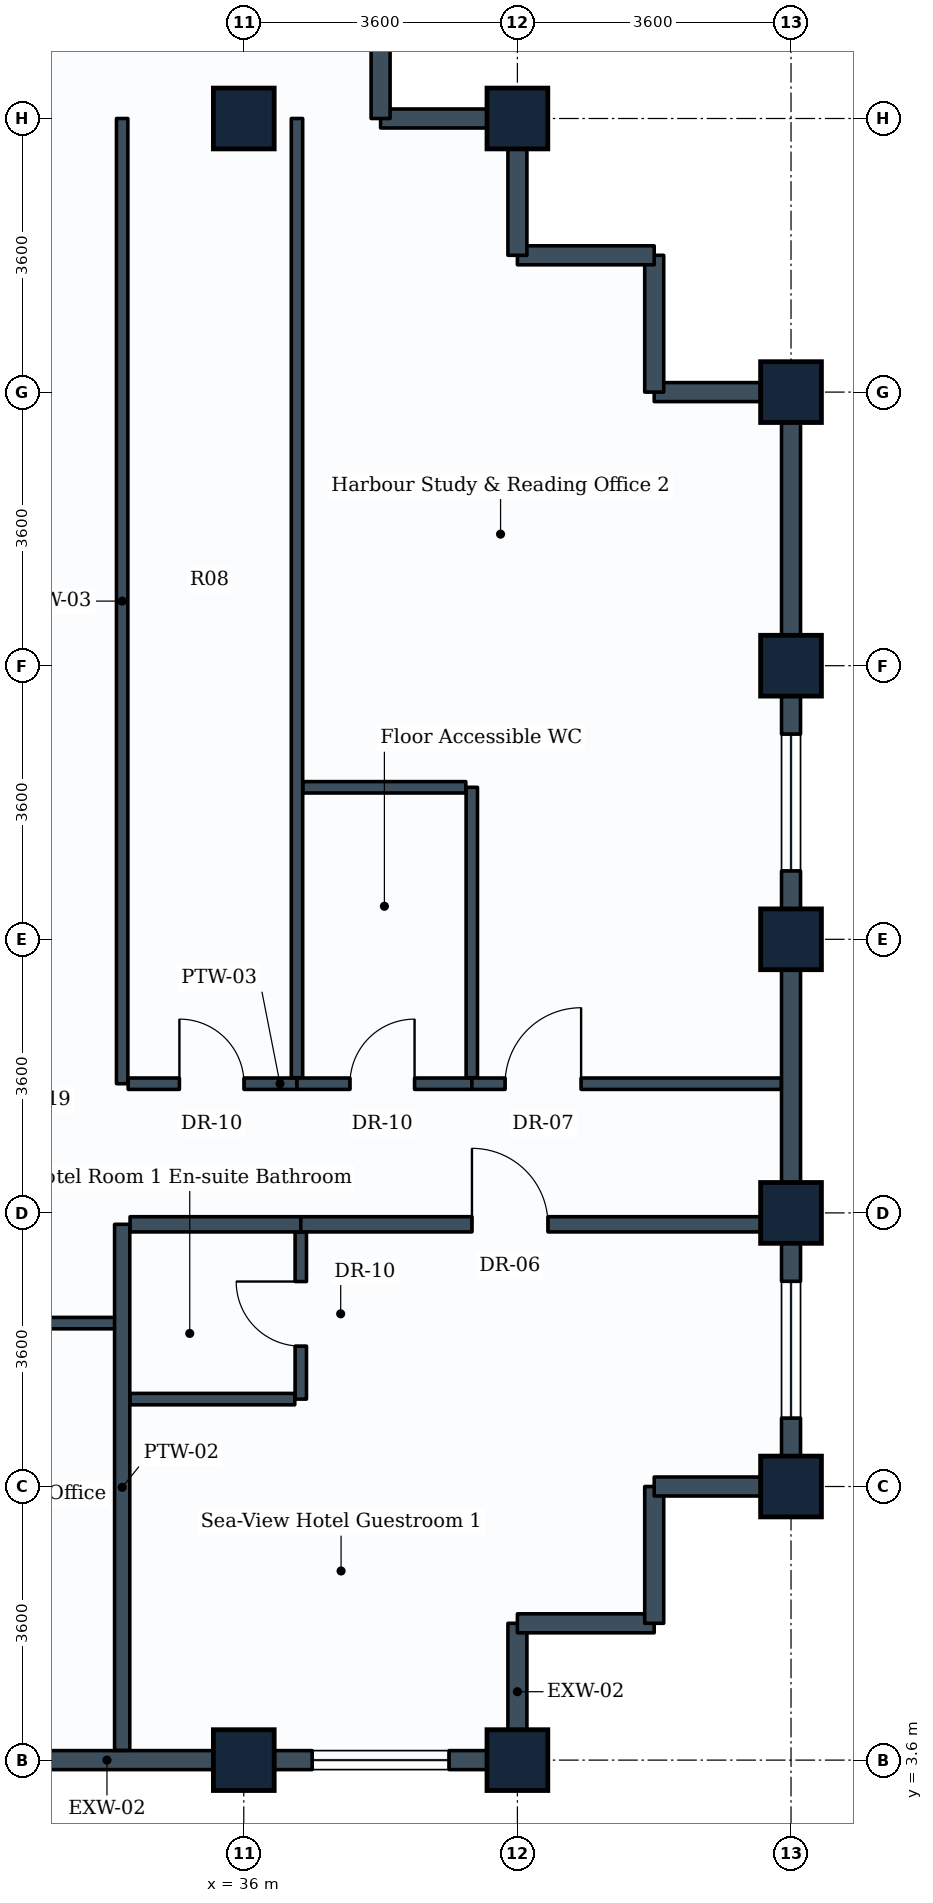
"""IFC4 building model, lengths in metres.
Left out: names, types, materials, properties, quantities, classifications, styles, units other than length and angle.
Written with IfcOpenShell. Run it as: python <this file> out.ifc"""

import sys

from ifc_helpers import new_model, si_unit, direction, frame, frame_2d, origin, origin_2d, place, context, subcontext, project, spatial, rectangle, extrude, element, fill, save


model = new_model("IFC4")
c1 = context("Model", 3, precision=1e-05, world=origin(), true_north=direction((0.0, 1.0)))
c2 = subcontext(c1, "Body", "Model", "MODEL_VIEW")
j1 = project(units=[si_unit("LENGTHUNIT", "METRE"), si_unit("PLANEANGLEUNIT", "RADIAN")], contexts=[c1])
p1 = place(None, origin())
s1 = spatial("IfcSite", under=j1, at=p1, CompositionType="ELEMENT")
p2 = place(p1, origin())
s2 = spatial("IfcBuilding", under=s1, at=p2, CompositionType="ELEMENT")
p3 = place(p2, frame((0.0, 0.0, 288.2)))
s3 = spatial("IfcBuildingStorey", under=s2, at=p3, CompositionType="ELEMENT", Elevation=288.2)
for number, where, z_axis, x_axis in (
    (1, (36.0, 3.6, 0.0), (0.0, 0.0, 1.0), (1.0, 0.0, 0.0)),
    (2, (36.0, 25.2, 0.0), (0.0, 0.0, 1.0), (1.0, 0.0, 0.0)),
    (3, (39.6, 3.6, 0.0), (0.0, 0.0, 1.0), (1.0, 0.0, 0.0)),
    (4, (39.6, 25.2, 0.0), (0.0, 0.0, 1.0), (1.0, 0.0, 0.0)),
    (5, (43.2, 7.2, 0.0), (0.0, 0.0, 1.0), (1.0, 0.0, 0.0)),
    (6, (43.2, 10.8, 0.0), (0.0, 0.0, 1.0), (0.0, 1.0, 0.0)),
    (7, (43.2, 14.4, 0.0), (0.0, 0.0, 1.0), (0.0, 1.0, 0.0)),
    (8, (43.2, 18.0, 0.0), (0.0, 0.0, 1.0), (0.0, 1.0, 0.0)),
    (9, (43.2, 21.6, 0.0), (0.0, 0.0, 1.0), (0.0, 1.0, 0.0)),
):
    element("IfcColumn", number, at=place(p3, frame(where, z_axis=z_axis, x_axis=x_axis)), inside=s3, PredefinedType="COLUMN", context=c2, shape_type="SweptSolid", body=[
        extrude(rectangle(XDim=0.8, YDim=0.8, at=origin_2d()), origin(), (0.0, 0.0, 1.0), 3.6),
    ])
p4 = place(p3, frame((36.0, 3.6, 0.0), z_axis=(0.0, 0.0, 1.0), x_axis=(-1.0, 0.0, 0.0)))
e10 = element("IfcWall", 10, at=p4, inside=s3, PredefinedType="STANDARD", context=c2, shape_type="SweptSolid", body=[
    extrude(rectangle(XDim=3.6, YDim=0.25, at=frame_2d((1.8, 0.0))), origin(), (0.0, 0.0, 1.0), 2.83),
])
p5 = place(p3, frame((39.6, 3.6, 0.0), z_axis=(0.0, 0.0, 1.0), x_axis=(-1.0, 0.0, 0.0)))
e11 = element("IfcWall", 11, at=p5, inside=s3, PredefinedType="STANDARD", context=c2, shape_type="SweptSolid", body=[
    extrude(rectangle(XDim=3.6, YDim=0.25, at=frame_2d((1.8, 0.0))), origin(), (0.0, 0.0, 1.0), 2.83),
])
p6 = place(p5, frame((0.9, 0.0, 0.85)))
e12 = element("IfcOpeningElement", 12, at=p6, cuts=e11, PredefinedType="OPENING", context=c2, shape_type="SweptSolid", body=[
    extrude(rectangle(XDim=1.8, YDim=1.35, at=frame_2d((0.9, 0.675))), frame((0.0, 0.135, 0.0), z_axis=(0.0, -1.0, 0.0), x_axis=(1.0, 0.0, 0.0)), (0.0, 0.0, 1.0), 0.27),
])
p7 = place(p3, frame((39.6, 5.4, 0.0), z_axis=(0.0, 0.0, 1.0), x_axis=(0.0, -1.0, 0.0)))
e13 = element("IfcWall", 13, at=p7, inside=s3, PredefinedType="STANDARD", context=c2, shape_type="SweptSolid", body=[
    extrude(rectangle(XDim=1.8, YDim=0.25, at=frame_2d((0.9, 0.0))), origin(), (0.0, 0.0, 1.0), 2.83),
])
p8 = place(p3, frame((41.4, 5.4, 0.0), z_axis=(0.0, 0.0, 1.0), x_axis=(-1.0, 0.0, 0.0)))
e14 = element("IfcWall", 14, at=p8, inside=s3, PredefinedType="STANDARD", context=c2, shape_type="SweptSolid", body=[
    extrude(rectangle(XDim=1.8, YDim=0.25, at=frame_2d((0.9, 0.0))), origin(), (0.0, 0.0, 1.0), 3.335),
])
p9 = place(p3, frame((41.4, 7.2, 0.0), z_axis=(0.0, 0.0, 1.0), x_axis=(0.0, -1.0, 0.0)))
e15 = element("IfcWall", 15, at=p9, inside=s3, PredefinedType="STANDARD", context=c2, shape_type="SweptSolid", body=[
    extrude(rectangle(XDim=1.8, YDim=0.25, at=frame_2d((0.9, 0.0))), origin(), (0.0, 0.0, 1.0), 3.335),
])
p10 = place(p3, frame((43.2, 7.2, 0.0), z_axis=(0.0, 0.0, 1.0), x_axis=(-1.0, 0.0, 0.0)))
e16 = element("IfcWall", 16, at=p10, inside=s3, PredefinedType="STANDARD", context=c2, shape_type="SweptSolid", body=[
    extrude(rectangle(XDim=1.8, YDim=0.25, at=frame_2d((0.9, 0.0))), origin(), (0.0, 0.0, 1.0), 2.83),
])
p11 = place(p3, frame((43.2, 10.8, 0.0), z_axis=(0.0, 0.0, 1.0), x_axis=(0.0, -1.0, 0.0)))
e17 = element("IfcWall", 17, at=p11, inside=s3, PredefinedType="STANDARD", context=c2, shape_type="SweptSolid", body=[
    extrude(rectangle(XDim=3.6, YDim=0.25, at=frame_2d((1.8, 0.0))), origin(), (0.0, 0.0, 1.0), 2.83),
])
p12 = place(p11, frame((0.9, 0.0, 0.85)))
e18 = element("IfcOpeningElement", 18, at=p12, cuts=e17, PredefinedType="OPENING", context=c2, shape_type="SweptSolid", body=[
    extrude(rectangle(XDim=1.8, YDim=1.35, at=frame_2d((0.9, 0.675))), frame((0.0, 0.135, 0.0), z_axis=(0.0, -1.0, 0.0), x_axis=(1.0, 0.0, 0.0)), (0.0, 0.0, 1.0), 0.27),
])
p13 = place(p3, frame((43.2, 14.4, 0.0), z_axis=(0.0, 0.0, 1.0), x_axis=(0.0, -1.0, 0.0)))
e19 = element("IfcWall", 19, at=p13, inside=s3, PredefinedType="STANDARD", context=c2, shape_type="SweptSolid", body=[
    extrude(rectangle(XDim=3.6, YDim=0.25, at=frame_2d((1.8, 0.0))), origin(), (0.0, 0.0, 1.0), 2.83),
])
p14 = place(p3, frame((43.2, 18.0, 0.0), z_axis=(0.0, 0.0, 1.0), x_axis=(0.0, -1.0, 0.0)))
e20 = element("IfcWall", 20, at=p14, inside=s3, PredefinedType="STANDARD", context=c2, shape_type="SweptSolid", body=[
    extrude(rectangle(XDim=3.6, YDim=0.25, at=frame_2d((1.8, 0.0))), origin(), (0.0, 0.0, 1.0), 2.83),
])
p15 = place(p14, frame((0.9, 0.0, 0.85)))
e21 = element("IfcOpeningElement", 21, at=p15, cuts=e20, PredefinedType="OPENING", context=c2, shape_type="SweptSolid", body=[
    extrude(rectangle(XDim=1.8, YDim=1.35, at=frame_2d((0.9, 0.675))), frame((0.0, 0.135, 0.0), z_axis=(0.0, -1.0, 0.0), x_axis=(1.0, 0.0, 0.0)), (0.0, 0.0, 1.0), 0.27),
])
p16 = place(p3, frame((43.2, 21.6, 0.0), z_axis=(0.0, 0.0, 1.0), x_axis=(0.0, -1.0, 0.0)))
e22 = element("IfcWall", 22, at=p16, inside=s3, PredefinedType="STANDARD", context=c2, shape_type="SweptSolid", body=[
    extrude(rectangle(XDim=3.6, YDim=0.25, at=frame_2d((1.8, 0.0))), origin(), (0.0, 0.0, 1.0), 2.83),
])
p17 = place(p3, frame((41.4, 21.6, 0.0), z_axis=(0.0, 0.0, 1.0), x_axis=(1.0, 0.0, 0.0)))
e23 = element("IfcWall", 23, at=p17, inside=s3, PredefinedType="STANDARD", context=c2, shape_type="SweptSolid", body=[
    extrude(rectangle(XDim=1.8, YDim=0.25, at=frame_2d((0.9, 0.0))), origin(), (0.0, 0.0, 1.0), 2.83),
])
for number, where, z_axis, x_axis in (
    (24, (41.4, 23.4, 0.0), (0.0, 0.0, 1.0), (0.0, -1.0, 0.0)),
    (25, (39.6, 23.4, 0.0), (0.0, 0.0, 1.0), (1.0, 0.0, 0.0)),
):
    element("IfcWall", number, at=place(p3, frame(where, z_axis=z_axis, x_axis=x_axis)), inside=s3, PredefinedType="STANDARD", context=c2, shape_type="SweptSolid", body=[
        extrude(rectangle(XDim=1.8, YDim=0.25, at=frame_2d((0.9, 0.0))), origin(), (0.0, 0.0, 1.0), 3.335),
    ])
for number, where, z_axis, x_axis in (
    (26, (39.6, 25.2, 0.0), (0.0, 0.0, 1.0), (0.0, -1.0, 0.0)),
    (27, (37.8, 25.2, 0.0), (0.0, 0.0, 1.0), (1.0, 0.0, 0.0)),
):
    element("IfcWall", number, at=place(p3, frame(where, z_axis=z_axis, x_axis=x_axis)), inside=s3, PredefinedType="STANDARD", context=c2, shape_type="SweptSolid", body=[
        extrude(rectangle(XDim=1.8, YDim=0.25, at=frame_2d((0.9, 0.0))), origin(), (0.0, 0.0, 1.0), 2.83),
    ])
p18 = place(p3, frame((37.8, 27.3, 0.0), z_axis=(0.0, 0.0, 1.0), x_axis=(0.0, -1.0, 0.0)))
e28 = element("IfcWall", 28, at=p18, inside=s3, PredefinedType="STANDARD", context=c2, shape_type="SweptSolid", body=[
    extrude(rectangle(XDim=2.1, YDim=0.25, at=frame_2d((1.05, 0.0))), origin(), (0.0, 0.0, 1.0), 2.83),
])
p19 = place(p3, frame((34.4, 12.5, 0.0), z_axis=(0.0, 0.0, 1.0), x_axis=(0.0, 1.0, 0.0)))
e29 = element("IfcWall", 29, at=p19, inside=s3, PredefinedType="PARTITIONING", context=c2, shape_type="SweptSolid", body=[
    extrude(rectangle(XDim=12.7, YDim=0.15, at=frame_2d((6.35, 0.0))), origin(), (0.0, 0.0, 1.0), 2.83),
])
p20 = place(p3, frame((34.479, 12.5, 0.0), z_axis=(0.0, 0.0, 1.0), x_axis=(1.0, 0.0, 0.0)))
e30 = element("IfcWall", 30, at=p20, inside=s3, PredefinedType="PARTITIONING", context=c2, shape_type="SweptSolid", body=[
    extrude(rectangle(XDim=2.221, YDim=0.15, at=frame_2d((1.11, 0.0))), origin(), (0.0, 0.0, 1.0), 3.02),
])
p21 = place(p20, frame((0.674, 0.0, 0.0)))
e31 = element("IfcOpeningElement", 31, at=p21, cuts=e30, PredefinedType="OPENING", context=c2, shape_type="SweptSolid", body=[
    extrude(rectangle(XDim=0.85, YDim=2.1, at=frame_2d((0.425, 1.05))), frame((0.0, 0.085, 0.0), z_axis=(0.0, -1.0, 0.0), x_axis=(1.0, 0.0, 0.0)), (0.0, 0.0, 1.0), 0.17),
])
p22 = place(p3, frame((36.7, 12.579, 0.0), z_axis=(0.0, 0.0, 1.0), x_axis=(0.0, 1.0, 0.0)))
e32 = element("IfcWall", 32, at=p22, inside=s3, PredefinedType="PARTITIONING", context=c2, shape_type="SweptSolid", body=[
    extrude(rectangle(XDim=12.621, YDim=0.15, at=frame_2d((6.311, 0.0))), origin(), (0.0, 0.0, 1.0), 2.83),
])
p23 = place(p3, frame((36.7, 12.5, 0.0), z_axis=(0.0, 0.0, 1.0), x_axis=(1.0, 0.0, 0.0)))
e33 = element("IfcWall", 33, at=p23, inside=s3, PredefinedType="PARTITIONING", context=c2, shape_type="SweptSolid", body=[
    extrude(rectangle(XDim=2.3, YDim=0.15, at=frame_2d((1.15, 0.0))), origin(), (0.0, 0.0, 1.0), 3.335),
])
p24 = place(p23, frame((0.697, 0.0, 0.0)))
e34 = element("IfcOpeningElement", 34, at=p24, cuts=e33, PredefinedType="OPENING", context=c2, shape_type="SweptSolid", body=[
    extrude(rectangle(XDim=0.85, YDim=2.1, at=frame_2d((0.425, 1.05))), frame((0.0, 0.085, 0.0), z_axis=(0.0, -1.0, 0.0), x_axis=(1.0, 0.0, 0.0)), (0.0, 0.0, 1.0), 0.17),
])
p25 = place(p3, frame((39.0, 12.579, 0.0), z_axis=(0.0, 0.0, 1.0), x_axis=(0.0, 1.0, 0.0)))
e35 = element("IfcWall", 35, at=p25, inside=s3, PredefinedType="PARTITIONING", context=c2, shape_type="SweptSolid", body=[
    extrude(rectangle(XDim=3.821, YDim=0.15, at=frame_2d((1.91, 0.0))), origin(), (0.0, 0.0, 1.0), 3.03),
])
p26 = place(p3, frame((36.779, 16.4, 0.0), z_axis=(0.0, 0.0, 1.0), x_axis=(1.0, 0.0, 0.0)))
e36 = element("IfcWall", 36, at=p26, inside=s3, PredefinedType="PARTITIONING", context=c2, shape_type="SweptSolid", body=[
    extrude(rectangle(XDim=2.142, YDim=0.15, at=frame_2d((1.071, 0.0))), origin(), (0.0, 0.0, 1.0), 3.335),
])
p27 = place(p3, frame((28.879, 9.35, 0.0), z_axis=(0.0, 0.0, 1.0), x_axis=(1.0, 0.0, 0.0)))
e37 = element("IfcWall", 37, at=p27, inside=s3, PredefinedType="PARTITIONING", context=c2, shape_type="SweptSolid", body=[
    extrude(rectangle(XDim=5.521, YDim=0.15, at=frame_2d((2.76, 0.0))), origin(), (0.0, 0.0, 1.0), 3.335),
])
p28 = place(p27, frame((0.36, 0.0, 0.0)))
e38 = element("IfcOpeningElement", 38, at=p28, cuts=e37, PredefinedType="OPENING", context=c2, shape_type="SweptSolid", body=[
    extrude(rectangle(XDim=1.0, YDim=2.1, at=frame_2d((0.5, 1.05))), frame((0.0, 0.085, 0.0), z_axis=(0.0, -1.0, 0.0), x_axis=(1.0, 0.0, 0.0)), (0.0, 0.0, 1.0), 0.17),
])
p29 = place(p3, frame((34.4, 3.729, 0.0), z_axis=(0.0, 0.0, 1.0), x_axis=(0.0, 1.0, 0.0)))
e39 = element("IfcWall", 39, at=p29, inside=s3, PredefinedType="PARTITIONING", context=c2, shape_type="SweptSolid", body=[
    extrude(rectangle(XDim=6.921, YDim=0.2, at=frame_2d((3.46, 0.0))), origin(), (0.0, 0.0, 1.0), 2.83),
])
p30 = place(p3, frame((34.504, 10.65, 0.0), z_axis=(0.0, 0.0, 1.0), x_axis=(1.0, 0.0, 0.0)))
e40 = element("IfcWall", 40, at=p30, inside=s3, PredefinedType="PARTITIONING", context=c2, shape_type="SweptSolid", body=[
    extrude(rectangle(XDim=2.246, YDim=0.2, at=frame_2d((1.123, 0.0))), origin(), (0.0, 0.0, 1.0), 3.02),
])
p31 = place(p3, frame((36.75, 10.65, 0.0), z_axis=(0.0, 0.0, 1.0), x_axis=(1.0, 0.0, 0.0)))
e41 = element("IfcWall", 41, at=p31, inside=s3, PredefinedType="PARTITIONING", context=c2, shape_type="SweptSolid", body=[
    extrude(rectangle(XDim=6.321, YDim=0.2, at=frame_2d((3.161, 0.0))), origin(), (0.0, 0.0, 1.0), 2.83),
])
p32 = place(p31, frame((2.252, 0.0, 0.0)))
e42 = element("IfcOpeningElement", 42, at=p32, cuts=e41, PredefinedType="OPENING", context=c2, shape_type="SweptSolid", body=[
    extrude(rectangle(XDim=1.0, YDim=2.1, at=frame_2d((0.5, 1.05))), frame((0.0, 0.11, 0.0), z_axis=(0.0, -1.0, 0.0), x_axis=(1.0, 0.0, 0.0)), (0.0, 0.0, 1.0), 0.22),
])
p33 = place(p3, frame((36.75, 8.35, 0.0), z_axis=(0.0, 0.0, 1.0), x_axis=(0.0, 1.0, 0.0)))
e43 = element("IfcWall", 43, at=p33, inside=s3, PredefinedType="PARTITIONING", context=c2, shape_type="SweptSolid", body=[
    extrude(rectangle(XDim=2.196, YDim=0.15, at=frame_2d((1.098, 0.0))), origin(), (0.0, 0.0, 1.0), 3.335),
])
p34 = place(p33, frame((0.697, 0.0, 0.0)))
e44 = element("IfcOpeningElement", 44, at=p34, cuts=e43, PredefinedType="OPENING", context=c2, shape_type="SweptSolid", body=[
    extrude(rectangle(XDim=0.85, YDim=2.1, at=frame_2d((0.425, 1.05))), frame((0.0, 0.085, 0.0), z_axis=(0.0, -1.0, 0.0), x_axis=(1.0, 0.0, 0.0)), (0.0, 0.0, 1.0), 0.17),
])
p35 = place(p3, frame((34.504, 8.35, 0.0), z_axis=(0.0, 0.0, 1.0), x_axis=(1.0, 0.0, 0.0)))
e45 = element("IfcWall", 45, at=p35, inside=s3, PredefinedType="PARTITIONING", context=c2, shape_type="SweptSolid", body=[
    extrude(rectangle(XDim=2.167, YDim=0.15, at=frame_2d((1.083, 0.0))), origin(), (0.0, 0.0, 1.0), 3.02),
])
p36 = place(p3, frame((39.0, 12.5, 0.0), z_axis=(0.0, 0.0, 1.0), x_axis=(1.0, 0.0, 0.0)))
e46 = element("IfcWall", 46, at=p36, inside=s3, PredefinedType="PARTITIONING", context=c2, shape_type="SweptSolid", body=[
    extrude(rectangle(XDim=4.071, YDim=0.15, at=frame_2d((2.036, 0.0))), origin(), (0.0, 0.0, 1.0), 2.83),
])
p37 = place(p36, frame((0.438, 0.0, 0.0)))
e47 = element("IfcOpeningElement", 47, at=p37, cuts=e46, PredefinedType="OPENING", context=c2, shape_type="SweptSolid", body=[
    extrude(rectangle(XDim=1.0, YDim=2.1, at=frame_2d((0.5, 1.05))), frame((0.0, 0.085, 0.0), z_axis=(0.0, -1.0, 0.0), x_axis=(1.0, 0.0, 0.0)), (0.0, 0.0, 1.0), 0.17),
])
p38 = place(p6, origin())
e48 = element("IfcWindow", 48, at=p38, inside=s3, PartitioningType="SINGLE_PANEL", PredefinedType="WINDOW", context=c2, shape_type="SweptSolid", body=[
    extrude(rectangle(XDim=1.8, YDim=1.35, at=frame_2d((0.9, 0.675))), frame((0.0, 0.03, 0.0), z_axis=(0.0, -1.0, 0.0), x_axis=(1.0, 0.0, 0.0)), (0.0, 0.0, 1.0), 0.06),
])
fill(e12, e48)
p39 = place(p12, origin())
e49 = element("IfcWindow", 49, at=p39, inside=s3, PartitioningType="SINGLE_PANEL", PredefinedType="WINDOW", context=c2, shape_type="SweptSolid", body=[
    extrude(rectangle(XDim=1.8, YDim=1.35, at=frame_2d((0.9, 0.675))), frame((0.0, 0.03, 0.0), z_axis=(0.0, -1.0, 0.0), x_axis=(1.0, 0.0, 0.0)), (0.0, 0.0, 1.0), 0.06),
])
fill(e18, e49)
p40 = place(p15, origin())
e50 = element("IfcWindow", 50, at=p40, inside=s3, PartitioningType="SINGLE_PANEL", PredefinedType="WINDOW", context=c2, shape_type="SweptSolid", body=[
    extrude(rectangle(XDim=1.8, YDim=1.35, at=frame_2d((0.9, 0.675))), frame((0.0, 0.03, 0.0), z_axis=(0.0, -1.0, 0.0), x_axis=(1.0, 0.0, 0.0)), (0.0, 0.0, 1.0), 0.06),
])
fill(e21, e50)
p41 = place(p21, origin())
e51 = element("IfcDoor", 51, at=p41, inside=s3, OperationType="SINGLE_SWING_LEFT", PredefinedType="DOOR", context=c2, shape_type="SweptSolid", body=[
    extrude(rectangle(XDim=0.85, YDim=2.1, at=frame_2d((0.425, 1.05))), frame((0.0, 0.025, 0.0), z_axis=(0.0, -1.0, 0.0), x_axis=(1.0, 0.0, 0.0)), (0.0, 0.0, 1.0), 0.05),
])
fill(e31, e51)
p42 = place(p24, origin())
e52 = element("IfcDoor", 52, at=p42, inside=s3, OperationType="SINGLE_SWING_RIGHT", PredefinedType="DOOR", context=c2, shape_type="SweptSolid", body=[
    extrude(rectangle(XDim=0.85, YDim=2.1, at=frame_2d((0.425, 1.05))), frame((0.0, 0.025, 0.0), z_axis=(0.0, -1.0, 0.0), x_axis=(1.0, 0.0, 0.0)), (0.0, 0.0, 1.0), 0.05),
])
fill(e34, e52)
p43 = place(p32, origin())
e53 = element("IfcDoor", 53, at=p43, inside=s3, OperationType="SINGLE_SWING_LEFT", PredefinedType="DOOR", context=c2, shape_type="SweptSolid", body=[
    extrude(rectangle(XDim=1.0, YDim=2.1, at=frame_2d((0.5, 1.05))), frame((0.0, 0.025, 0.0), z_axis=(0.0, -1.0, 0.0), x_axis=(1.0, 0.0, 0.0)), (0.0, 0.0, 1.0), 0.05),
])
fill(e42, e53)
p44 = place(p34, origin())
e54 = element("IfcDoor", 54, at=p44, inside=s3, OperationType="SINGLE_SWING_RIGHT", PredefinedType="DOOR", context=c2, shape_type="SweptSolid", body=[
    extrude(rectangle(XDim=0.85, YDim=2.1, at=frame_2d((0.425, 1.05))), frame((0.0, 0.025, 0.0), z_axis=(0.0, -1.0, 0.0), x_axis=(1.0, 0.0, 0.0)), (0.0, 0.0, 1.0), 0.05),
])
fill(e44, e54)
p45 = place(p37, origin())
e55 = element("IfcDoor", 55, at=p45, inside=s3, OperationType="SINGLE_SWING_RIGHT", PredefinedType="DOOR", context=c2, shape_type="SweptSolid", body=[
    extrude(rectangle(XDim=1.0, YDim=2.1, at=frame_2d((0.5, 1.05))), frame((0.0, 0.025, 0.0), z_axis=(0.0, -1.0, 0.0), x_axis=(1.0, 0.0, 0.0)), (0.0, 0.0, 1.0), 0.05),
])
fill(e47, e55)
save(model, sys.argv[1])
